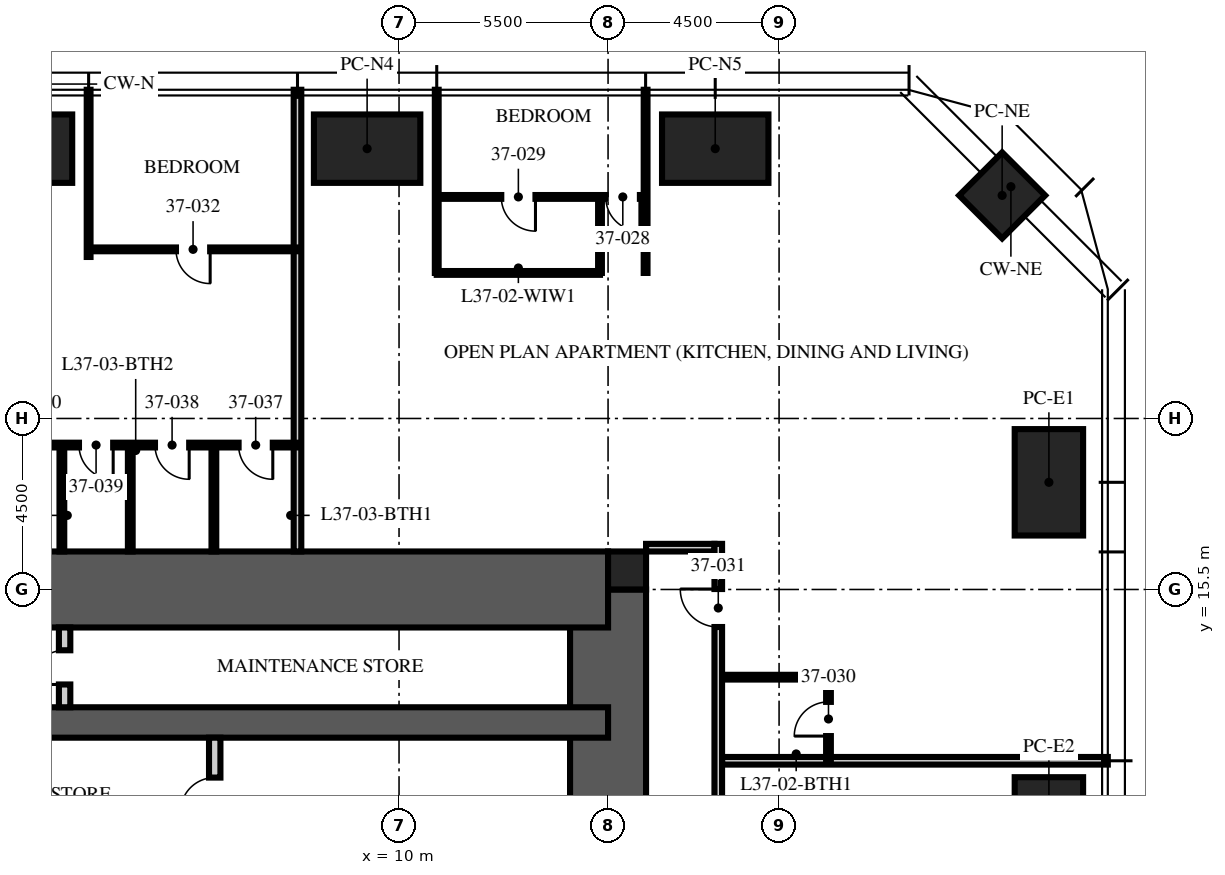
"""IFC4 building model, lengths in metres.
Left out: names, types, materials, properties, quantities, classifications, styles, units other than length and angle.
Written with IfcOpenShell. Run it as: python <this file> out.ifc"""

import sys

from ifc_helpers import new_model, si_unit, direction, frame, frame_2d, origin, origin_2d, place, context, subcontext, project, spatial, rectangle, extrude, element, fill, save


model = new_model("IFC4")
c1 = context("Model", 3, precision=1e-05, world=origin(), true_north=direction((0.0, 1.0)))
c2 = subcontext(c1, "Body", "Model", "MODEL_VIEW")
j1 = project(units=[si_unit("LENGTHUNIT", "METRE"), si_unit("PLANEANGLEUNIT", "RADIAN")], contexts=[c1])
p1 = place(None, origin())
s1 = spatial("IfcSite", under=j1, at=p1, CompositionType="ELEMENT")
p2 = place(p1, origin())
s2 = spatial("IfcBuilding", under=s1, at=p2, CompositionType="ELEMENT")
p3 = place(p2, frame((0.0, 0.0, 148.5)))
s3 = spatial("IfcBuildingStorey", under=s2, at=p3, CompositionType="ELEMENT", Elevation=148.5)
p4 = place(p3, frame((15.5, -15.5, -0.25), z_axis=(0.0, 0.0, 1.0), x_axis=(0.0, 1.0, 0.0)))
e1 = element("IfcWall", 1, at=p4, inside=s3, PredefinedType="SHEAR", context=c2, shape_type="SweptSolid", body=[
    extrude(rectangle(XDim=31.0, YDim=2.0, at=frame_2d((15.5, 0.0))), origin(), (0.0, 0.0, 1.0), 3.75),
])
p5 = place(p4, frame((6.5, 0.0, 0.25)))
e2 = element("IfcOpeningElement", 2, at=p5, cuts=e1, PredefinedType="OPENING", context=c2, shape_type="SweptSolid", body=[
    extrude(rectangle(XDim=1.2, YDim=2.1, at=frame_2d((0.6, 1.05))), frame((0.0, 1.01, 0.0), z_axis=(0.0, -1.0, 0.0), x_axis=(1.0, 0.0, 0.0)), (0.0, 0.0, 1.0), 2.02),
])
p6 = place(p4, frame((23.0, 0.0, 0.25)))
e3 = element("IfcOpeningElement", 3, at=p6, cuts=e1, PredefinedType="OPENING", context=c2, shape_type="SweptSolid", body=[
    extrude(rectangle(XDim=1.8, YDim=2.1, at=frame_2d((0.9, 1.05))), frame((0.0, 1.01, 0.0), z_axis=(0.0, -1.0, 0.0), x_axis=(1.0, 0.0, 0.0)), (0.0, 0.0, 1.0), 2.02),
])
p7 = place(p3, frame((-15.5, 15.5, -0.25), z_axis=(0.0, 0.0, 1.0), x_axis=(1.0, 0.0, 0.0)))
e4 = element("IfcWall", 4, at=p7, inside=s3, PredefinedType="SHEAR", context=c2, shape_type="SweptSolid", body=[
    extrude(rectangle(XDim=31.0, YDim=2.0, at=frame_2d((15.5, 0.0))), origin(), (0.0, 0.0, 1.0), 3.75),
])
p8 = place(p7, frame((5.0, 0.0, 0.25)))
e5 = element("IfcOpeningElement", 5, at=p8, cuts=e4, PredefinedType="OPENING", context=c2, shape_type="SweptSolid", body=[
    extrude(rectangle(XDim=1.0, YDim=2.1, at=frame_2d((0.5, 1.05))), frame((0.0, 1.01, 0.0), z_axis=(0.0, -1.0, 0.0), x_axis=(1.0, 0.0, 0.0)), (0.0, 0.0, 1.0), 2.02),
])
p9 = place(p3, frame((-15.5, 12.0, -0.25), z_axis=(0.0, 0.0, 1.0), x_axis=(1.0, 0.0, 0.0)))
e6 = element("IfcWall", 6, at=p9, inside=s3, PredefinedType="SHEAR", context=c2, shape_type="SweptSolid", body=[
    extrude(rectangle(XDim=31.0, YDim=0.8, at=frame_2d((15.5, 0.0))), origin(), (0.0, 0.0, 1.0), 3.75),
])
p10 = place(p3, frame((16.0, 16.0, -0.25), z_axis=(0.0, 0.0, 1.0), x_axis=(1.0, 0.0, 0.0)))
e7 = element("IfcColumn", 7, at=p10, inside=s3, PredefinedType="COLUMN", context=c2, shape_type="SweptSolid", body=[
    extrude(rectangle(XDim=1.0, YDim=1.0, at=origin_2d()), origin(), (0.0, 0.0, 1.0), 3.75),
])
for number, where, z_axis, x_axis in (
    (8, (0.0, 27.1, 0.0), (0.0, 0.0, 1.0), (1.0, 0.0, 0.0)),
    (9, (9.16, 27.1, 0.0), (0.0, 0.0, 1.0), (1.0, 0.0, 0.0)),
    (10, (18.32, 27.1, 0.0), (0.0, 0.0, 1.0), (1.0, 0.0, 0.0)),
    (11, (27.1, 18.32, 0.0), (0.0, 0.0, 1.0), (0.0, 1.0, 0.0)),
    (12, (27.1, 9.16, 0.0), (0.0, 0.0, 1.0), (0.0, 1.0, 0.0)),
):
    element("IfcColumn", number, at=place(p3, frame(where, z_axis=z_axis, x_axis=x_axis)), inside=s3, PredefinedType="COLUMN", context=c2, shape_type="SweptSolid", body=[
        extrude(rectangle(XDim=2.8, YDim=1.8, at=origin_2d()), origin(), (0.0, 0.0, 1.0), 3.75),
    ])
p11 = place(p3, frame((25.87, 25.87, 0.0), z_axis=(0.0, 0.0, 1.0), x_axis=(0.707106781187, -0.707106781187, 0.0)))
e13 = element("IfcColumn", 13, at=p11, inside=s3, PredefinedType="COLUMN", context=c2, shape_type="SweptSolid", body=[
    extrude(rectangle(XDim=1.6, YDim=1.6, at=origin_2d()), origin(), (0.0, 0.0, 1.0), 3.75),
])
p12 = place(p3, frame((5.15, 5.3, 0.0), z_axis=(0.0, 0.0, 1.0), x_axis=(0.0, 1.0, 0.0)))
e14 = element("IfcWall", 14, at=p12, inside=s3, PredefinedType="PARTITIONING", context=c2, shape_type="SweptSolid", body=[
    extrude(rectangle(XDim=6.3, YDim=0.3, at=frame_2d((3.15, 0.0))), origin(), (0.0, 0.0, 1.0), 3.5),
])
p13 = place(p12, frame((4.35, 0.0, 0.0)))
e15 = element("IfcOpeningElement", 15, at=p13, cuts=e14, PredefinedType="OPENING", context=c2, shape_type="SweptSolid", body=[
    extrude(rectangle(XDim=0.9, YDim=2.1, at=frame_2d((0.45, 1.05))), frame((0.0, 0.16, 0.0), z_axis=(0.0, -1.0, 0.0), x_axis=(1.0, 0.0, 0.0)), (0.0, 0.0, 1.0), 0.32),
])
p14 = place(p3, frame((1.2, 12.4, 0.0), z_axis=(0.0, 0.0, 1.0), x_axis=(0.0, 1.0, 0.0)))
e16 = element("IfcWall", 16, at=p14, inside=s3, PredefinedType="PARTITIONING", context=c2, shape_type="SweptSolid", body=[
    extrude(rectangle(XDim=2.1, YDim=0.3, at=frame_2d((1.05, 0.0))), origin(), (0.0, 0.0, 1.0), 3.5),
])
p15 = place(p14, frame((0.6, 0.0, 0.0)))
e17 = element("IfcOpeningElement", 17, at=p15, cuts=e16, PredefinedType="OPENING", context=c2, shape_type="SweptSolid", body=[
    extrude(rectangle(XDim=0.9, YDim=2.1, at=frame_2d((0.45, 1.05))), frame((0.0, 0.16, 0.0), z_axis=(0.0, -1.0, 0.0), x_axis=(1.0, 0.0, 0.0)), (0.0, 0.0, 1.0), 0.32),
])
p16 = place(p3, frame((16.5, 16.6, 0.0), z_axis=(0.0, 0.0, 1.0), x_axis=(1.0, 0.0, 0.0)))
e18 = element("IfcWall", 18, at=p16, inside=s3, PredefinedType="PARTITIONING", context=c2, shape_type="SweptSolid", body=[
    extrude(rectangle(XDim=1.8, YDim=0.2, at=frame_2d((0.9, 0.0))), origin(), (0.0, 0.0, 1.0), 2.3),
])
p17 = place(p3, frame((18.5, 10.992, 0.0), z_axis=(0.0, 0.0, 1.0), x_axis=(1.0, 0.0, 0.0)))
e19 = element("IfcWall", 19, at=p17, inside=s3, PredefinedType="PARTITIONING", context=c2, shape_type="SweptSolid", body=[
    extrude(rectangle(XDim=10.15, YDim=0.2, at=frame_2d((5.075, 0.0))), origin(), (0.0, 0.0, 1.0), 2.81),
])
for number, where, z_axis, x_axis in (
    (20, (16.488, 23.83, 0.0), (0.0, 0.0, 1.0), (0.0, 1.0, 0.0)),
    (21, (10.992, 23.83, 0.0), (0.0, 0.0, 1.0), (0.0, 1.0, 0.0)),
):
    element("IfcWall", number, at=place(p3, frame(where, z_axis=z_axis, x_axis=x_axis)), inside=s3, PredefinedType="PARTITIONING", context=c2, shape_type="SweptSolid", body=[
        extrude(rectangle(XDim=4.82, YDim=0.1, at=frame_2d((2.41, 0.0))), origin(), (0.0, 0.0, 1.0), 2.81),
    ])
p18 = place(p3, frame((7.328, 16.5, 0.0), z_axis=(0.0, 0.0, 1.0), x_axis=(0.0, 1.0, 0.0)))
e22 = element("IfcWall", 22, at=p18, inside=s3, PredefinedType="PARTITIONING", context=c2, shape_type="SweptSolid", body=[
    extrude(rectangle(XDim=12.15, YDim=0.2, at=frame_2d((6.075, 0.0))), origin(), (0.0, 0.0, 1.0), 2.81),
])
p19 = place(p3, frame((1.832, 24.25, 0.0), z_axis=(0.0, 0.0, 1.0), x_axis=(0.0, 1.0, 0.0)))
e23 = element("IfcWall", 23, at=p19, inside=s3, PredefinedType="PARTITIONING", context=c2, shape_type="SweptSolid", body=[
    extrude(rectangle(XDim=4.4, YDim=0.1, at=frame_2d((2.2, 0.0))), origin(), (0.0, 0.0, 1.0), 2.81),
])
p20 = place(p3, frame((16.488, 25.83, 0.0), z_axis=(0.0, 0.0, 1.0), x_axis=(-1.0, 0.0, 0.0)))
e24 = element("IfcWall", 24, at=p20, inside=s3, PredefinedType="PARTITIONING", context=c2, shape_type="SweptSolid", body=[
    extrude(rectangle(XDim=5.496, YDim=0.1, at=frame_2d((2.748, 0.0))), origin(), (0.0, 0.0, 1.0), 2.81),
])
p21 = place(p20, frame((0.15, 0.0, 0.0)))
e25 = element("IfcOpeningElement", 25, at=p21, cuts=e24, PredefinedType="OPENING", context=c2, shape_type="SweptSolid", body=[
    extrude(rectangle(XDim=0.9, YDim=2.1, at=frame_2d((0.45, 1.05))), frame((0.0, 0.06, 0.0), z_axis=(0.0, -1.0, 0.0), x_axis=(1.0, 0.0, 0.0)), (0.0, 0.0, 1.0), 0.12),
])
p22 = place(p20, frame((2.898, 0.0, 0.0)))
e26 = element("IfcOpeningElement", 26, at=p22, cuts=e24, PredefinedType="OPENING", context=c2, shape_type="SweptSolid", body=[
    extrude(rectangle(XDim=0.9, YDim=2.1, at=frame_2d((0.45, 1.05))), frame((0.0, 0.06, 0.0), z_axis=(0.0, -1.0, 0.0), x_axis=(1.0, 0.0, 0.0)), (0.0, 0.0, 1.0), 0.12),
])
p23 = place(p3, frame((15.288, 23.83, 0.0), z_axis=(0.0, 0.0, 1.0), x_axis=(0.0, 1.0, 0.0)))
e27 = element("IfcWall", 27, at=p23, inside=s3, PredefinedType="PARTITIONING", context=c2, shape_type="SweptSolid", body=[
    extrude(rectangle(XDim=2.0, YDim=0.1, at=frame_2d((1.0, 0.0))), origin(), (0.0, 0.0, 1.0), 3.5),
])
p24 = place(p3, frame((15.288, 23.83, 0.0), z_axis=(0.0, 0.0, 1.0), x_axis=(-1.0, 0.0, 0.0)))
e28 = element("IfcWall", 28, at=p24, inside=s3, PredefinedType="PARTITIONING", context=c2, shape_type="SweptSolid", body=[
    extrude(rectangle(XDim=4.296, YDim=0.1, at=frame_2d((2.148, 0.0))), origin(), (0.0, 0.0, 1.0), 2.81),
])
p25 = place(p3, frame((21.3, 10.992, 0.0), z_axis=(0.0, 0.0, 1.0), x_axis=(0.0, 1.0, 0.0)))
e29 = element("IfcWall", 29, at=p25, inside=s3, PredefinedType="PARTITIONING", context=c2, shape_type="SweptSolid", body=[
    extrude(rectangle(XDim=2.2, YDim=0.125, at=frame_2d((1.1, 0.0))), origin(), (0.0, 0.0, 1.0), 3.5),
])
p26 = place(p25, frame((0.65, 0.0, 0.0)))
e30 = element("IfcOpeningElement", 30, at=p26, cuts=e29, PredefinedType="OPENING", context=c2, shape_type="SweptSolid", body=[
    extrude(rectangle(XDim=0.9, YDim=2.1, at=frame_2d((0.45, 1.05))), frame((0.0, 0.073, 0.0), z_axis=(0.0, -1.0, 0.0), x_axis=(1.0, 0.0, 0.0)), (0.0, 0.0, 1.0), 0.145),
])
p27 = place(p3, frame((18.5, 13.192, 0.0), z_axis=(0.0, 0.0, 1.0), x_axis=(1.0, 0.0, 0.0)))
e31 = element("IfcWall", 31, at=p27, inside=s3, PredefinedType="PARTITIONING", context=c2, shape_type="SweptSolid", body=[
    extrude(rectangle(XDim=2.8, YDim=0.125, at=frame_2d((1.4, 0.0))), origin(), (0.0, 0.0, 1.0), 3.5),
])
p28 = place(p3, frame((7.328, 24.45, 0.0), z_axis=(0.0, 0.0, 1.0), x_axis=(-1.0, 0.0, 0.0)))
e32 = element("IfcWall", 32, at=p28, inside=s3, PredefinedType="PARTITIONING", context=c2, shape_type="SweptSolid", body=[
    extrude(rectangle(XDim=5.496, YDim=0.1, at=frame_2d((2.748, 0.0))), origin(), (0.0, 0.0, 1.0), 2.81),
])
p29 = place(p28, frame((2.298, 0.0, 0.0)))
e33 = element("IfcOpeningElement", 33, at=p29, cuts=e32, PredefinedType="OPENING", context=c2, shape_type="SweptSolid", body=[
    extrude(rectangle(XDim=0.9, YDim=2.1, at=frame_2d((0.45, 1.05))), frame((0.0, 0.06, 0.0), z_axis=(0.0, -1.0, 0.0), x_axis=(1.0, 0.0, 0.0)), (0.0, 0.0, 1.0), 0.12),
])
p30 = place(p3, frame((7.328, 19.3, 0.0), z_axis=(0.0, 0.0, 1.0), x_axis=(-1.0, 0.0, 0.0)))
e34 = element("IfcWall", 34, at=p30, inside=s3, PredefinedType="PARTITIONING", context=c2, shape_type="SweptSolid", body=[
    extrude(rectangle(XDim=7.7, YDim=0.125, at=frame_2d((3.85, 0.0))), origin(), (0.0, 0.0, 1.0), 2.7),
])
p31 = place(p30, frame((0.65, 0.0, 0.0)))
e35 = element("IfcOpeningElement", 35, at=p31, cuts=e34, PredefinedType="OPENING", context=c2, shape_type="SweptSolid", body=[
    extrude(rectangle(XDim=0.9, YDim=2.1, at=frame_2d((0.45, 1.05))), frame((0.0, 0.073, 0.0), z_axis=(0.0, -1.0, 0.0), x_axis=(1.0, 0.0, 0.0)), (0.0, 0.0, 1.0), 0.145),
])
p32 = place(p30, frame((2.85, 0.0, 0.0)))
e36 = element("IfcOpeningElement", 36, at=p32, cuts=e34, PredefinedType="OPENING", context=c2, shape_type="SweptSolid", body=[
    extrude(rectangle(XDim=0.9, YDim=2.1, at=frame_2d((0.45, 1.05))), frame((0.0, 0.073, 0.0), z_axis=(0.0, -1.0, 0.0), x_axis=(1.0, 0.0, 0.0)), (0.0, 0.0, 1.0), 0.145),
])
p33 = place(p30, frame((4.85, 0.0, 0.0)))
e37 = element("IfcOpeningElement", 37, at=p33, cuts=e34, PredefinedType="OPENING", context=c2, shape_type="SweptSolid", body=[
    extrude(rectangle(XDim=0.9, YDim=2.1, at=frame_2d((0.45, 1.05))), frame((0.0, 0.073, 0.0), z_axis=(0.0, -1.0, 0.0), x_axis=(1.0, 0.0, 0.0)), (0.0, 0.0, 1.0), 0.145),
])
p34 = place(p30, frame((6.5, 0.0, 0.0)))
e38 = element("IfcOpeningElement", 38, at=p34, cuts=e34, PredefinedType="OPENING", context=c2, shape_type="SweptSolid", body=[
    extrude(rectangle(XDim=0.9, YDim=2.1, at=frame_2d((0.45, 1.05))), frame((0.0, 0.073, 0.0), z_axis=(0.0, -1.0, 0.0), x_axis=(1.0, 0.0, 0.0)), (0.0, 0.0, 1.0), 0.145),
])
for number, where, z_axis, x_axis in (
    (39, (5.128, 16.5, 0.0), (0.0, 0.0, 1.0), (0.0, 1.0, 0.0)),
    (40, (2.928, 16.5, 0.0), (0.0, 0.0, 1.0), (0.0, 1.0, 0.0)),
    (41, (1.128, 16.5, 0.0), (0.0, 0.0, 1.0), (0.0, 1.0, 0.0)),
):
    element("IfcWall", number, at=place(p3, frame(where, z_axis=z_axis, x_axis=x_axis)), inside=s3, PredefinedType="PARTITIONING", context=c2, shape_type="SweptSolid", body=[
        extrude(rectangle(XDim=2.8, YDim=0.125, at=frame_2d((1.4, 0.0))), origin(), (0.0, 0.0, 1.0), 3.5),
    ])
p35 = place(p3, frame((18.4, -5.328, 0.0), z_axis=(0.0, 0.0, 1.0), x_axis=(0.0, 1.0, 0.0)))
e42 = element("IfcWall", 42, at=p35, inside=s3, PredefinedType="PARTITIONING", context=c2, shape_type="SweptSolid", body=[
    extrude(rectangle(XDim=22.028, YDim=0.2, at=frame_2d((11.014, 0.0))), origin(), (0.0, 0.0, 1.0), 2.7),
])
p36 = place(p35, frame((19.84, 0.0, 0.0)))
e43 = element("IfcOpeningElement", 43, at=p36, cuts=e42, PredefinedType="OPENING", context=c2, shape_type="SweptSolid", body=[
    extrude(rectangle(XDim=1.0, YDim=2.2, at=frame_2d((0.5, 1.1))), frame((0.0, 0.11, 0.0), z_axis=(0.0, -1.0, 0.0), x_axis=(1.0, 0.0, 0.0)), (0.0, 0.0, 1.0), 0.22),
])
p37 = place(p13, origin())
e44 = element("IfcDoor", 44, at=p37, inside=s3, OperationType="SINGLE_SWING_LEFT", PredefinedType="DOOR", context=c2, shape_type="SweptSolid", body=[
    extrude(rectangle(XDim=0.9, YDim=2.1, at=frame_2d((0.45, 1.05))), frame((0.0, 0.025, 0.0), z_axis=(0.0, -1.0, 0.0), x_axis=(1.0, 0.0, 0.0)), (0.0, 0.0, 1.0), 0.05),
])
fill(e15, e44)
p38 = place(p15, origin())
e45 = element("IfcDoor", 45, at=p38, inside=s3, OperationType="SINGLE_SWING_LEFT", PredefinedType="DOOR", context=c2, shape_type="SweptSolid", body=[
    extrude(rectangle(XDim=0.9, YDim=2.1, at=frame_2d((0.45, 1.05))), frame((0.0, 0.025, 0.0), z_axis=(0.0, -1.0, 0.0), x_axis=(1.0, 0.0, 0.0)), (0.0, 0.0, 1.0), 0.05),
])
fill(e17, e45)
p39 = place(p21, origin())
e46 = element("IfcDoor", 46, at=p39, inside=s3, OperationType="SINGLE_SWING_LEFT", PredefinedType="DOOR", context=c2, shape_type="SweptSolid", body=[
    extrude(rectangle(XDim=0.9, YDim=2.1, at=frame_2d((0.45, 1.05))), frame((0.0, 0.025, 0.0), z_axis=(0.0, -1.0, 0.0), x_axis=(1.0, 0.0, 0.0)), (0.0, 0.0, 1.0), 0.05),
])
fill(e25, e46)
p40 = place(p22, origin())
e47 = element("IfcDoor", 47, at=p40, inside=s3, OperationType="SINGLE_SWING_LEFT", PredefinedType="DOOR", context=c2, shape_type="SweptSolid", body=[
    extrude(rectangle(XDim=0.9, YDim=2.1, at=frame_2d((0.45, 1.05))), frame((0.0, 0.025, 0.0), z_axis=(0.0, -1.0, 0.0), x_axis=(1.0, 0.0, 0.0)), (0.0, 0.0, 1.0), 0.05),
])
fill(e26, e47)
p41 = place(p26, origin())
e48 = element("IfcDoor", 48, at=p41, inside=s3, OperationType="SINGLE_SWING_LEFT", PredefinedType="DOOR", context=c2, shape_type="SweptSolid", body=[
    extrude(rectangle(XDim=0.9, YDim=2.1, at=frame_2d((0.45, 1.05))), frame((0.0, 0.025, 0.0), z_axis=(0.0, -1.0, 0.0), x_axis=(1.0, 0.0, 0.0)), (0.0, 0.0, 1.0), 0.05),
])
fill(e30, e48)
p42 = place(p36, origin())
e49 = element("IfcDoor", 49, at=p42, inside=s3, OperationType="SINGLE_SWING_RIGHT", PredefinedType="DOOR", context=c2, shape_type="SweptSolid", body=[
    extrude(rectangle(XDim=1.0, YDim=2.2, at=frame_2d((0.5, 1.1))), frame((0.0, 0.025, 0.0), z_axis=(0.0, -1.0, 0.0), x_axis=(1.0, 0.0, 0.0)), (0.0, 0.0, 1.0), 0.05),
])
fill(e43, e49)
p43 = place(p29, origin())
e50 = element("IfcDoor", 50, at=p43, inside=s3, OperationType="SINGLE_SWING_LEFT", PredefinedType="DOOR", context=c2, shape_type="SweptSolid", body=[
    extrude(rectangle(XDim=0.9, YDim=2.1, at=frame_2d((0.45, 1.05))), frame((0.0, 0.025, 0.0), z_axis=(0.0, -1.0, 0.0), x_axis=(1.0, 0.0, 0.0)), (0.0, 0.0, 1.0), 0.05),
])
fill(e33, e50)
p44 = place(p31, origin())
e51 = element("IfcDoor", 51, at=p44, inside=s3, OperationType="SINGLE_SWING_LEFT", PredefinedType="DOOR", context=c2, shape_type="SweptSolid", body=[
    extrude(rectangle(XDim=0.9, YDim=2.1, at=frame_2d((0.45, 1.05))), frame((0.0, 0.025, 0.0), z_axis=(0.0, -1.0, 0.0), x_axis=(1.0, 0.0, 0.0)), (0.0, 0.0, 1.0), 0.05),
])
fill(e35, e51)
p45 = place(p32, origin())
e52 = element("IfcDoor", 52, at=p45, inside=s3, OperationType="SINGLE_SWING_LEFT", PredefinedType="DOOR", context=c2, shape_type="SweptSolid", body=[
    extrude(rectangle(XDim=0.9, YDim=2.1, at=frame_2d((0.45, 1.05))), frame((0.0, 0.025, 0.0), z_axis=(0.0, -1.0, 0.0), x_axis=(1.0, 0.0, 0.0)), (0.0, 0.0, 1.0), 0.05),
])
fill(e36, e52)
p46 = place(p33, origin())
e53 = element("IfcDoor", 53, at=p46, inside=s3, OperationType="SINGLE_SWING_LEFT", PredefinedType="DOOR", context=c2, shape_type="SweptSolid", body=[
    extrude(rectangle(XDim=0.9, YDim=2.1, at=frame_2d((0.45, 1.05))), frame((0.0, 0.025, 0.0), z_axis=(0.0, -1.0, 0.0), x_axis=(1.0, 0.0, 0.0)), (0.0, 0.0, 1.0), 0.05),
])
fill(e37, e53)
save(model, sys.argv[1])
